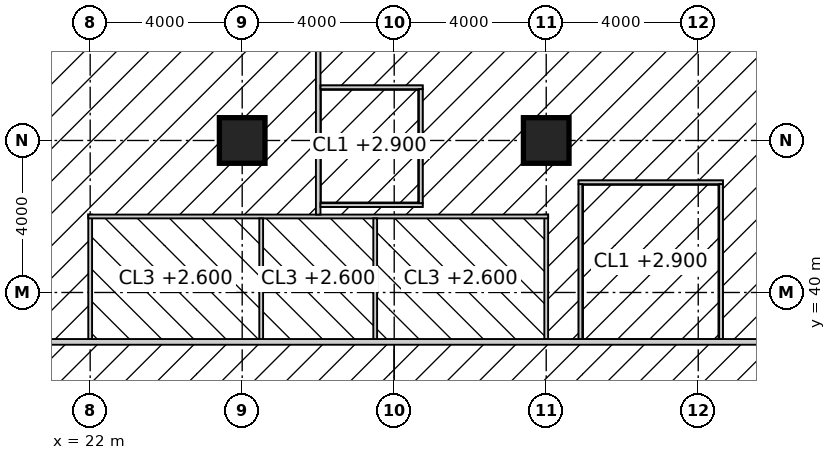
"""IFC4 building model, lengths in metres.
Left out: names, types, materials, properties, quantities, classifications, styles, units other than length and angle.
Written with IfcOpenShell. Run it as: python <this file> out.ifc"""

import sys

from ifc_helpers import new_model, si_unit, direction, frame, frame_2d, origin, origin_2d, place, context, subcontext, project, spatial, rectangle, hollow_rectangle, extrude, element, fill, save


model = new_model("IFC4")
c1 = context("Model", 3, precision=1e-05, world=origin(), true_north=direction((0.0, 1.0)))
c2 = subcontext(c1, "Body", "Model", "MODEL_VIEW")
j1 = project(units=[si_unit("LENGTHUNIT", "METRE"), si_unit("PLANEANGLEUNIT", "RADIAN")], contexts=[c1])
p1 = place(None, origin())
s1 = spatial("IfcSite", under=j1, at=p1, CompositionType="ELEMENT")
p2 = place(p1, origin())
s2 = spatial("IfcBuilding", under=s1, at=p2, CompositionType="ELEMENT")
p3 = place(p2, frame((0.0, 0.0, 51.0)))
s3 = spatial("IfcBuildingStorey", under=s2, at=p3, CompositionType="ELEMENT", Elevation=51.0)
for number, where, z_axis, x_axis in (
    (1, (26.0, 44.0, 0.0), (0.0, 0.0, 1.0), (1.0, 0.0, 0.0)),
    (2, (34.0, 44.0, 0.0), (0.0, 0.0, 1.0), (1.0, 0.0, 0.0)),
):
    element("IfcColumn", number, at=place(p3, frame(where, z_axis=z_axis, x_axis=x_axis)), inside=s3, PredefinedType="COLUMN", context=c2, shape_type="SweptSolid", body=[
        extrude(hollow_rectangle(XDim=1.2, YDim=1.2, WallThickness=0.1, at=origin_2d()), origin(), (0.0, 0.0, 1.0), 4.0),
    ])
p4 = place(p3, frame((15.175, 38.7, 0.0), z_axis=(0.0, 0.0, 1.0), x_axis=(1.0, 0.0, 0.0)))
e3 = element("IfcWall", 3, at=p4, inside=s3, PredefinedType="PARTITIONING", context=c2, shape_type="SweptSolid", body=[
    extrude(rectangle(XDim=29.05, YDim=0.15, at=frame_2d((14.525, 0.0))), origin(), (0.0, 0.0, 1.0), 3.85),
])
p5 = place(p4, frame((8.575, 0.0, 0.0)))
e4 = element("IfcOpeningElement", 4, at=p5, cuts=e3, PredefinedType="OPENING", context=c2, shape_type="SweptSolid", body=[
    extrude(rectangle(XDim=0.9, YDim=2.1, at=frame_2d((0.45, 1.05))), frame((0.0, 0.085, 0.0), z_axis=(0.0, -1.0, 0.0), x_axis=(1.0, 0.0, 0.0)), (0.0, 0.0, 1.0), 0.17),
])
p6 = place(p4, frame((12.325, 0.0, 0.0)))
e5 = element("IfcOpeningElement", 5, at=p6, cuts=e3, PredefinedType="OPENING", context=c2, shape_type="SweptSolid", body=[
    extrude(rectangle(XDim=1.0, YDim=2.1, at=frame_2d((0.5, 1.05))), frame((0.0, 0.085, 0.0), z_axis=(0.0, -1.0, 0.0), x_axis=(1.0, 0.0, 0.0)), (0.0, 0.0, 1.0), 0.17),
])
p7 = place(p4, frame((16.175, 0.0, 0.0)))
e6 = element("IfcOpeningElement", 6, at=p7, cuts=e3, PredefinedType="OPENING", context=c2, shape_type="SweptSolid", body=[
    extrude(rectangle(XDim=0.9, YDim=2.1, at=frame_2d((0.45, 1.05))), frame((0.0, 0.085, 0.0), z_axis=(0.0, -1.0, 0.0), x_axis=(1.0, 0.0, 0.0)), (0.0, 0.0, 1.0), 0.17),
])
for number, where, z_axis, x_axis in (
    (7, (22.0, 38.775, 0.0), (0.0, 0.0, 1.0), (0.0, 1.0, 0.0)),
    (8, (34.0, 38.775, 0.0), (0.0, 0.0, 1.0), (0.0, 1.0, 0.0)),
):
    element("IfcWall", number, at=place(p3, frame(where, z_axis=z_axis, x_axis=x_axis)), inside=s3, PredefinedType="PARTITIONING", context=c2, shape_type="SweptSolid", body=[
        extrude(rectangle(XDim=3.275, YDim=0.1, at=frame_2d((1.638, 0.0))), origin(), (0.0, 0.0, 1.0), 2.95),
    ])
p8 = place(p3, frame((21.95, 42.0, 0.0), z_axis=(0.0, 0.0, 1.0), x_axis=(1.0, 0.0, 0.0)))
e9 = element("IfcWall", 9, at=p8, inside=s3, PredefinedType="PARTITIONING", context=c2, shape_type="SweptSolid", body=[
    extrude(rectangle(XDim=12.1, YDim=0.1, at=frame_2d((6.05, 0.0))), origin(), (0.0, 0.0, 1.0), 3.85),
])
for number, where, z_axis, x_axis in (
    (10, (26.5, 38.775, 0.0), (0.0, 0.0, 1.0), (0.0, 1.0, 0.0)),
    (11, (29.5, 38.775, 0.0), (0.0, 0.0, 1.0), (0.0, 1.0, 0.0)),
):
    element("IfcWall", number, at=place(p3, frame(where, z_axis=z_axis, x_axis=x_axis)), inside=s3, PredefinedType="PARTITIONING", context=c2, shape_type="SweptSolid", body=[
        extrude(rectangle(XDim=3.175, YDim=0.1, at=frame_2d((1.587, 0.0))), origin(), (0.0, 0.0, 1.0), 3.85),
    ])
p9 = place(p3, frame((28.0, 42.05, 0.0), z_axis=(0.0, 0.0, 1.0), x_axis=(0.0, 1.0, 0.0)))
e12 = element("IfcWall", 12, at=p9, inside=s3, PredefinedType="PARTITIONING", context=c2, shape_type="SweptSolid", body=[
    extrude(rectangle(XDim=5.65, YDim=0.12, at=frame_2d((2.825, 0.0))), origin(), (0.0, 0.0, 1.0), 3.85),
])
p10 = place(p3, frame((28.06, 42.3, 0.0), z_axis=(0.0, 0.0, 1.0), x_axis=(1.0, 0.0, 0.0)))
e13 = element("IfcWall", 13, at=p10, inside=s3, PredefinedType="PARTITIONING", context=c2, shape_type="SweptSolid", body=[
    extrude(rectangle(XDim=2.69, YDim=0.1, at=frame_2d((1.345, 0.0))), origin(), (0.0, 0.0, 1.0), 3.85),
])
p11 = place(p3, frame((34.85, 42.9, 0.0), z_axis=(0.0, 0.0, 1.0), x_axis=(1.0, 0.0, 0.0)))
e14 = element("IfcWall", 14, at=p11, inside=s3, PredefinedType="PARTITIONING", context=c2, shape_type="SweptSolid", body=[
    extrude(rectangle(XDim=3.8, YDim=0.1, at=frame_2d((1.9, 0.0))), origin(), (0.0, 0.0, 1.0), 3.85),
])
p12 = place(p11, frame((1.4, 0.0, 0.0)))
e15 = element("IfcOpeningElement", 15, at=p12, cuts=e14, PredefinedType="OPENING", context=c2, shape_type="SweptSolid", body=[
    extrude(rectangle(XDim=1.0, YDim=2.2, at=frame_2d((0.5, 1.1))), frame((0.0, 0.06, 0.0), z_axis=(0.0, -1.0, 0.0), x_axis=(1.0, 0.0, 0.0)), (0.0, 0.0, 1.0), 0.12),
])
p13 = place(p3, frame((28.06, 45.4, 0.0), z_axis=(0.0, 0.0, 1.0), x_axis=(1.0, 0.0, 0.0)))
e16 = element("IfcWall", 16, at=p13, inside=s3, PredefinedType="PARTITIONING", context=c2, shape_type="SweptSolid", body=[
    extrude(rectangle(XDim=2.69, YDim=0.1, at=frame_2d((1.345, 0.0))), origin(), (0.0, 0.0, 1.0), 3.85),
])
p14 = place(p3, frame((30.7, 42.35, 0.0), z_axis=(0.0, 0.0, 1.0), x_axis=(0.0, 1.0, 0.0)))
e17 = element("IfcWall", 17, at=p14, inside=s3, PredefinedType="PARTITIONING", context=c2, shape_type="SweptSolid", body=[
    extrude(rectangle(XDim=3.0, YDim=0.1, at=frame_2d((1.5, 0.0))), origin(), (0.0, 0.0, 1.0), 3.85),
])
p15 = place(p14, frame((1.0, 0.0, 0.0)))
e18 = element("IfcOpeningElement", 18, at=p15, cuts=e17, PredefinedType="OPENING", context=c2, shape_type="SweptSolid", body=[
    extrude(rectangle(XDim=1.0, YDim=2.2, at=frame_2d((0.5, 1.1))), frame((0.0, 0.06, 0.0), z_axis=(0.0, -1.0, 0.0), x_axis=(1.0, 0.0, 0.0)), (0.0, 0.0, 1.0), 0.12),
])
for number, where, z_axis, x_axis in (
    (19, (34.9, 38.775, 0.0), (0.0, 0.0, 1.0), (0.0, 1.0, 0.0)),
    (20, (38.6, 38.775, 0.0), (0.0, 0.0, 1.0), (0.0, 1.0, 0.0)),
):
    element("IfcWall", number, at=place(p3, frame(where, z_axis=z_axis, x_axis=x_axis)), inside=s3, PredefinedType="PARTITIONING", context=c2, shape_type="SweptSolid", body=[
        extrude(rectangle(XDim=4.075, YDim=0.1, at=frame_2d((2.038, 0.0))), origin(), (0.0, 0.0, 1.0), 3.85),
    ])
p16 = place(p5, origin())
e21 = element("IfcDoor", 21, at=p16, inside=s3, OperationType="SINGLE_SWING_LEFT", PredefinedType="DOOR", context=c2, shape_type="SweptSolid", body=[
    extrude(rectangle(XDim=0.9, YDim=2.1, at=frame_2d((0.45, 1.05))), frame((0.0, 0.025, 0.0), z_axis=(0.0, -1.0, 0.0), x_axis=(1.0, 0.0, 0.0)), (0.0, 0.0, 1.0), 0.05),
])
fill(e4, e21)
p17 = place(p6, origin())
e22 = element("IfcDoor", 22, at=p17, inside=s3, OperationType="SLIDING_TO_LEFT", PredefinedType="DOOR", context=c2, shape_type="SweptSolid", body=[
    extrude(rectangle(XDim=1.0, YDim=2.1, at=frame_2d((0.5, 1.05))), frame((0.0, 0.025, 0.0), z_axis=(0.0, -1.0, 0.0), x_axis=(1.0, 0.0, 0.0)), (0.0, 0.0, 1.0), 0.05),
])
fill(e5, e22)
p18 = place(p7, origin())
e23 = element("IfcDoor", 23, at=p18, inside=s3, OperationType="SINGLE_SWING_LEFT", PredefinedType="DOOR", context=c2, shape_type="SweptSolid", body=[
    extrude(rectangle(XDim=0.9, YDim=2.1, at=frame_2d((0.45, 1.05))), frame((0.0, 0.025, 0.0), z_axis=(0.0, -1.0, 0.0), x_axis=(1.0, 0.0, 0.0)), (0.0, 0.0, 1.0), 0.05),
])
fill(e6, e23)
p19 = place(p12, origin())
e24 = element("IfcDoor", 24, at=p19, inside=s3, OperationType="SINGLE_SWING_RIGHT", PredefinedType="DOOR", context=c2, shape_type="SweptSolid", body=[
    extrude(rectangle(XDim=1.0, YDim=2.2, at=frame_2d((0.5, 1.1))), frame((0.0, 0.025, 0.0), z_axis=(0.0, -1.0, 0.0), x_axis=(1.0, 0.0, 0.0)), (0.0, 0.0, 1.0), 0.05),
])
fill(e15, e24)
p20 = place(p15, origin())
e25 = element("IfcDoor", 25, at=p20, inside=s3, OperationType="SINGLE_SWING_LEFT", PredefinedType="DOOR", context=c2, shape_type="SweptSolid", body=[
    extrude(rectangle(XDim=1.0, YDim=2.2, at=frame_2d((0.5, 1.1))), frame((0.0, 0.025, 0.0), z_axis=(0.0, -1.0, 0.0), x_axis=(1.0, 0.0, 0.0)), (0.0, 0.0, 1.0), 0.05),
])
fill(e18, e25)
save(model, sys.argv[1])
